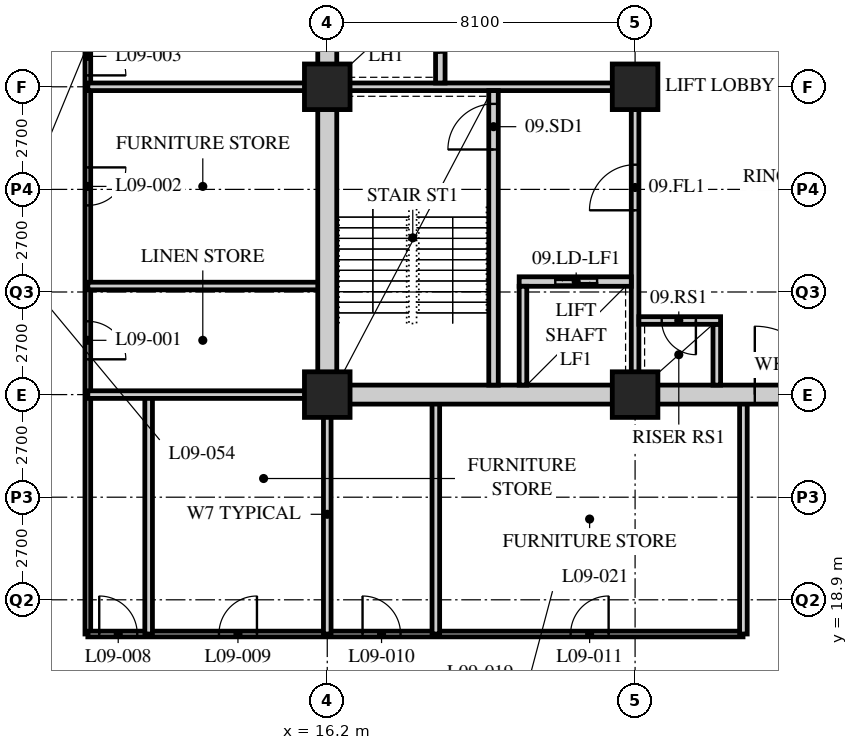
"""IFC4 building model, lengths in metres.
Left out: names, types, materials, properties, quantities, classifications, styles, units other than length and angle.
Written with IfcOpenShell. Run it as: python <this file> out.ifc"""

import sys

from ifc_helpers import new_model, si_unit, direction, frame, frame_2d, origin, origin_2d, place, context, subcontext, project, spatial, rectangle, hollow_rectangle, extrude, element, fill, save


model = new_model("IFC4")
c1 = context("Model", 3, precision=1e-05, world=origin(), true_north=direction((0.0, 1.0)))
c2 = subcontext(c1, "Body", "Model", "MODEL_VIEW")
j1 = project(units=[si_unit("LENGTHUNIT", "METRE"), si_unit("PLANEANGLEUNIT", "RADIAN")], contexts=[c1])
p1 = place(None, origin())
s1 = spatial("IfcSite", under=j1, at=p1, CompositionType="ELEMENT")
p2 = place(p1, origin())
s2 = spatial("IfcBuilding", under=s1, at=p2, CompositionType="ELEMENT")
p3 = place(p2, frame((0.0, 0.0, 43.2)))
s3 = spatial("IfcBuildingStorey", under=s2, at=p3, CompositionType="ELEMENT", Elevation=43.2)
for number, where, z_axis, x_axis in (
    (1, (16.2, 24.3, 0.0), (0.0, 0.0, 1.0), (1.0, 0.0, 0.0)),
    (2, (16.2, 32.4, 0.0), (0.0, 0.0, 1.0), (1.0, 0.0, 0.0)),
    (3, (24.3, 24.3, 0.0), (0.0, 0.0, 1.0), (1.0, 0.0, 0.0)),
    (4, (24.3, 32.4, 0.0), (0.0, 0.0, 1.0), (1.0, 0.0, 0.0)),
):
    element("IfcColumn", number, at=place(p3, frame(where, z_axis=z_axis, x_axis=x_axis)), inside=s3, PredefinedType="COLUMN", context=c2, shape_type="SweptSolid", body=[
        extrude(hollow_rectangle(XDim=1.2, YDim=1.2, WallThickness=0.12, at=origin_2d()), origin(), (0.0, 0.0, 1.0), 3.4),
    ])
p4 = place(p3, frame((9.9, 40.5, 0.0), z_axis=(0.0, 0.0, 1.0), x_axis=(0.0, -1.0, 0.0)))
e5 = element("IfcWall", 5, at=p4, inside=s3, PredefinedType="PARTITIONING", context=c2, shape_type="SweptSolid", body=[
    extrude(rectangle(XDim=22.5, YDim=0.15, at=frame_2d((11.25, 0.0))), origin(), (0.0, 0.0, 1.0), 3.19),
])
p5 = place(p4, frame((14.271, 0.0, 0.0)))
e6 = element("IfcOpeningElement", 6, at=p5, cuts=e5, PredefinedType="OPENING", context=c2, shape_type="SweptSolid", body=[
    extrude(rectangle(XDim=1.0, YDim=2.1, at=frame_2d((0.5, 1.05))), frame((0.0, 0.085, 0.0), z_axis=(0.0, -1.0, 0.0), x_axis=(1.0, 0.0, 0.0)), (0.0, 0.0, 1.0), 0.17),
])
p6 = place(p4, frame((10.221, 0.0, 0.0)))
e7 = element("IfcOpeningElement", 7, at=p6, cuts=e5, PredefinedType="OPENING", context=c2, shape_type="SweptSolid", body=[
    extrude(rectangle(XDim=1.0, YDim=2.1, at=frame_2d((0.5, 1.05))), frame((0.0, 0.085, 0.0), z_axis=(0.0, -1.0, 0.0), x_axis=(1.0, 0.0, 0.0)), (0.0, 0.0, 1.0), 0.17),
])
p7 = place(p4, frame((6.8, 0.0, 0.0)))
e8 = element("IfcOpeningElement", 8, at=p7, cuts=e5, PredefinedType="OPENING", context=c2, shape_type="SweptSolid", body=[
    extrude(rectangle(XDim=1.0, YDim=2.1, at=frame_2d((0.5, 1.05))), frame((0.0, 0.085, 0.0), z_axis=(0.0, -1.0, 0.0), x_axis=(1.0, 0.0, 0.0)), (0.0, 0.0, 1.0), 0.17),
])
p8 = place(p4, frame((2.75, 0.0, 0.0)))
e9 = element("IfcOpeningElement", 9, at=p8, cuts=e5, PredefinedType="OPENING", context=c2, shape_type="SweptSolid", body=[
    extrude(rectangle(XDim=1.0, YDim=2.1, at=frame_2d((0.5, 1.05))), frame((0.0, 0.085, 0.0), z_axis=(0.0, -1.0, 0.0), x_axis=(1.0, 0.0, 0.0)), (0.0, 0.0, 1.0), 0.17),
])
p9 = place(p3, frame((9.9, 18.0, 0.0), z_axis=(0.0, 0.0, 1.0), x_axis=(1.0, 0.0, 0.0)))
e10 = element("IfcWall", 10, at=p9, inside=s3, PredefinedType="PARTITIONING", context=c2, shape_type="SweptSolid", body=[
    extrude(rectangle(XDim=17.24, YDim=0.15, at=frame_2d((8.62, 0.0))), origin(), (0.0, 0.0, 1.0), 3.19),
])
p10 = place(p9, frame((0.3, 0.0, 0.0)))
e11 = element("IfcOpeningElement", 11, at=p10, cuts=e10, PredefinedType="OPENING", context=c2, shape_type="SweptSolid", body=[
    extrude(rectangle(XDim=1.0, YDim=2.1, at=frame_2d((0.5, 1.05))), frame((0.0, 0.085, 0.0), z_axis=(0.0, -1.0, 0.0), x_axis=(1.0, 0.0, 0.0)), (0.0, 0.0, 1.0), 0.17),
])
p11 = place(p9, frame((3.45, 0.0, 0.0)))
e12 = element("IfcOpeningElement", 12, at=p11, cuts=e10, PredefinedType="OPENING", context=c2, shape_type="SweptSolid", body=[
    extrude(rectangle(XDim=1.0, YDim=2.1, at=frame_2d((0.5, 1.05))), frame((0.0, 0.085, 0.0), z_axis=(0.0, -1.0, 0.0), x_axis=(1.0, 0.0, 0.0)), (0.0, 0.0, 1.0), 0.17),
])
p12 = place(p9, frame((7.229, 0.0, 0.0)))
e13 = element("IfcOpeningElement", 13, at=p12, cuts=e10, PredefinedType="OPENING", context=c2, shape_type="SweptSolid", body=[
    extrude(rectangle(XDim=1.0, YDim=2.1, at=frame_2d((0.5, 1.05))), frame((0.0, 0.085, 0.0), z_axis=(0.0, -1.0, 0.0), x_axis=(1.0, 0.0, 0.0)), (0.0, 0.0, 1.0), 0.17),
])
p13 = place(p9, frame((12.704, 0.0, 0.0)))
e14 = element("IfcOpeningElement", 14, at=p13, cuts=e10, PredefinedType="OPENING", context=c2, shape_type="SweptSolid", body=[
    extrude(rectangle(XDim=1.0, YDim=2.1, at=frame_2d((0.5, 1.05))), frame((0.0, 0.085, 0.0), z_axis=(0.0, -1.0, 0.0), x_axis=(1.0, 0.0, 0.0)), (0.0, 0.0, 1.0), 0.17),
])
p14 = place(p3, frame((9.9, 32.4, 0.0), z_axis=(0.0, 0.0, 1.0), x_axis=(1.0, 0.0, 0.0)))
e15 = element("IfcWall", 15, at=p14, inside=s3, PredefinedType="SOLIDWALL", context=c2, shape_type="SweptSolid", body=[
    extrude(rectangle(XDim=6.3, YDim=0.2, at=frame_2d((3.15, 0.0))), origin(), (0.0, 0.0, 1.0), 2.578),
])
p15 = place(p3, frame((9.9, 27.157, 0.0), z_axis=(0.0, 0.0, 1.0), x_axis=(1.0, 0.0, 0.0)))
e16 = element("IfcWall", 16, at=p15, inside=s3, PredefinedType="SOLIDWALL", context=c2, shape_type="SweptSolid", body=[
    extrude(rectangle(XDim=6.3, YDim=0.2, at=frame_2d((3.15, 0.0))), origin(), (0.0, 0.0, 1.0), 3.19),
])
p16 = place(p3, frame((16.2, 18.0, 0.0), z_axis=(0.0, 0.0, 1.0), x_axis=(0.0, 1.0, 0.0)))
e17 = element("IfcWall", 17, at=p16, inside=s3, PredefinedType="SOLIDWALL", context=c2, shape_type="SweptSolid", body=[
    extrude(rectangle(XDim=6.3, YDim=0.2, at=frame_2d((3.15, 0.0))), origin(), (0.0, 0.0, 1.0), 2.578),
])
for number, where, z_axis, x_axis in (
    (18, (11.5, 18.0, 0.0), (0.0, 0.0, 1.0), (0.0, 1.0, 0.0)),
    (19, (19.057, 18.0, 0.0), (0.0, 0.0, 1.0), (0.0, 1.0, 0.0)),
    (20, (27.15, 18.0, 0.0), (0.0, 0.0, 1.0), (0.0, 1.0, 0.0)),
):
    element("IfcWall", number, at=place(p3, frame(where, z_axis=z_axis, x_axis=x_axis)), inside=s3, PredefinedType="SOLIDWALL", context=c2, shape_type="SweptSolid", body=[
        extrude(rectangle(XDim=6.3, YDim=0.2, at=frame_2d((3.15, 0.0))), origin(), (0.0, 0.0, 1.0), 3.19),
    ])
p17 = place(p3, frame((9.9, 24.3, 0.0), z_axis=(0.0, 0.0, 1.0), x_axis=(1.0, 0.0, 0.0)))
e21 = element("IfcWall", 21, at=p17, inside=s3, PredefinedType="SOLIDWALL", context=c2, shape_type="SweptSolid", body=[
    extrude(rectangle(XDim=6.3, YDim=0.2, at=frame_2d((3.15, 0.0))), origin(), (0.0, 0.0, 1.0), 2.578),
])
p18 = place(p3, frame((15.95, 24.3, 0.0), z_axis=(0.0, 0.0, 1.0), x_axis=(1.0, 0.0, 0.0)))
e22 = element("IfcWall", 22, at=p18, inside=s3, PredefinedType="SOLIDWALL", context=c2, shape_type="SweptSolid", body=[
    extrude(rectangle(XDim=24.8, YDim=0.5, at=frame_2d((12.4, 0.0))), origin(), (0.0, 0.0, 1.0), 2.54),
])
p19 = place(p18, frame((11.5, 0.0, 0.0)))
e23 = element("IfcOpeningElement", 23, at=p19, cuts=e22, PredefinedType="OPENING", context=c2, shape_type="SweptSolid", body=[
    extrude(rectangle(XDim=1.8, YDim=2.4, at=frame_2d((0.9, 1.2))), frame((0.0, 0.26, 0.0), z_axis=(0.0, -1.0, 0.0), x_axis=(1.0, 0.0, 0.0)), (0.0, 0.0, 1.0), 0.52),
])
p20 = place(p3, frame((16.2, 24.55, 0.0), z_axis=(0.0, 0.0, 1.0), x_axis=(0.0, 1.0, 0.0)))
e24 = element("IfcWall", 24, at=p20, inside=s3, PredefinedType="SOLIDWALL", context=c2, shape_type="SweptSolid", body=[
    extrude(rectangle(XDim=15.7, YDim=0.5, at=frame_2d((7.85, 0.0))), origin(), (0.0, 0.0, 1.0), 2.578),
])
p21 = place(p3, frame((16.45, 32.4, 0.0), z_axis=(0.0, 0.0, 1.0), x_axis=(1.0, 0.0, 0.0)))
e25 = element("IfcWall", 25, at=p21, inside=s3, PredefinedType="SOLIDWALL", context=c2, shape_type="SweptSolid", body=[
    extrude(rectangle(XDim=7.95, YDim=0.2, at=frame_2d((3.975, 0.0))), origin(), (0.0, 0.0, 1.0), 2.578),
])
p22 = place(p3, frame((24.3, 24.55, 0.0), z_axis=(0.0, 0.0, 1.0), x_axis=(0.0, 1.0, 0.0)))
e26 = element("IfcWall", 26, at=p22, inside=s3, PredefinedType="SOLIDWALL", context=c2, shape_type="SweptSolid", body=[
    extrude(rectangle(XDim=7.75, YDim=0.2, at=frame_2d((3.875, 0.0))), origin(), (0.0, 0.0, 1.0), 2.578),
])
p23 = place(p22, frame((4.6, 0.0, 0.0)))
e27 = element("IfcOpeningElement", 27, at=p23, cuts=e26, PredefinedType="OPENING", context=c2, shape_type="SweptSolid", body=[
    extrude(rectangle(XDim=1.2, YDim=2.1, at=frame_2d((0.6, 1.05))), frame((0.0, 0.11, 0.0), z_axis=(0.0, -1.0, 0.0), x_axis=(1.0, 0.0, 0.0)), (0.0, 0.0, 1.0), 0.22),
])
p24 = place(p3, frame((20.575, 24.55, 0.0), z_axis=(0.0, 0.0, 1.0), x_axis=(0.0, 1.0, 0.0)))
e28 = element("IfcWall", 28, at=p24, inside=s3, PredefinedType="SOLIDWALL", context=c2, shape_type="SweptSolid", body=[
    extrude(rectangle(XDim=7.75, YDim=0.25, at=frame_2d((3.875, 0.0))), origin(), (0.0, 0.0, 1.0), 3.19),
])
p25 = place(p24, frame((6.2, 0.0, 0.0)))
e29 = element("IfcOpeningElement", 29, at=p25, cuts=e28, PredefinedType="OPENING", context=c2, shape_type="SweptSolid", body=[
    extrude(rectangle(XDim=1.2, YDim=2.1, at=frame_2d((0.6, 1.05))), frame((0.0, 0.135, 0.0), z_axis=(0.0, -1.0, 0.0), x_axis=(1.0, 0.0, 0.0)), (0.0, 0.0, 1.0), 0.27),
])
p26 = place(p3, frame((21.25, 27.275, 0.0), z_axis=(0.0, 0.0, 1.0), x_axis=(1.0, 0.0, 0.0)))
e30 = element("IfcWall", 30, at=p26, inside=s3, PredefinedType="SOLIDWALL", context=c2, shape_type="SweptSolid", body=[
    extrude(rectangle(XDim=2.95, YDim=0.25, at=frame_2d((1.475, 0.0))), origin(), (0.0, 0.0, 1.0), 3.19),
])
p27 = place(p26, frame((0.95, 0.0, 0.0)))
e31 = element("IfcOpeningElement", 31, at=p27, cuts=e30, PredefinedType="OPENING", context=c2, shape_type="SweptSolid", body=[
    extrude(rectangle(XDim=1.1, YDim=2.4, at=frame_2d((0.55, 1.2))), frame((0.0, 0.135, 0.0), z_axis=(0.0, -1.0, 0.0), x_axis=(1.0, 0.0, 0.0)), (0.0, 0.0, 1.0), 0.27),
])
p28 = place(p3, frame((21.35, 24.55, 0.0), z_axis=(0.0, 0.0, 1.0), x_axis=(0.0, 1.0, 0.0)))
e32 = element("IfcWall", 32, at=p28, inside=s3, PredefinedType="SOLIDWALL", context=c2, shape_type="SweptSolid", body=[
    extrude(rectangle(XDim=2.6, YDim=0.2, at=frame_2d((1.3, 0.0))), origin(), (0.0, 0.0, 1.0), 3.19),
])
p29 = place(p3, frame((19.175, 32.5, 0.0), z_axis=(0.0, 0.0, 1.0), x_axis=(0.0, 1.0, 0.0)))
e33 = element("IfcWall", 33, at=p29, inside=s3, PredefinedType="SOLIDWALL", context=c2, shape_type="SweptSolid", body=[
    extrude(rectangle(XDim=7.75, YDim=0.25, at=frame_2d((3.875, 0.0))), origin(), (0.0, 0.0, 1.0), 3.19),
])
p30 = place(p29, frame((0.8, 0.0, 0.0)))
e34 = element("IfcOpeningElement", 34, at=p30, cuts=e33, PredefinedType="OPENING", context=c2, shape_type="SweptSolid", body=[
    extrude(rectangle(XDim=1.1, YDim=2.4, at=frame_2d((0.55, 1.2))), frame((0.0, 0.135, 0.0), z_axis=(0.0, -1.0, 0.0), x_axis=(1.0, 0.0, 0.0)), (0.0, 0.0, 1.0), 0.27),
])
p31 = place(p29, frame((3.4, 0.0, 0.0)))
e35 = element("IfcOpeningElement", 35, at=p31, cuts=e33, PredefinedType="OPENING", context=c2, shape_type="SweptSolid", body=[
    extrude(rectangle(XDim=1.1, YDim=2.4, at=frame_2d((0.55, 1.2))), frame((0.0, 0.135, 0.0), z_axis=(0.0, -1.0, 0.0), x_axis=(1.0, 0.0, 0.0)), (0.0, 0.0, 1.0), 0.27),
])
p32 = place(p29, frame((6.0, 0.0, 0.0)))
e36 = element("IfcOpeningElement", 36, at=p32, cuts=e33, PredefinedType="OPENING", context=c2, shape_type="SweptSolid", body=[
    extrude(rectangle(XDim=1.1, YDim=2.4, at=frame_2d((0.55, 1.2))), frame((0.0, 0.135, 0.0), z_axis=(0.0, -1.0, 0.0), x_axis=(1.0, 0.0, 0.0)), (0.0, 0.0, 1.0), 0.27),
])
p33 = place(p3, frame((26.45, 24.55, 0.0), z_axis=(0.0, 0.0, 1.0), x_axis=(0.0, 1.0, 0.0)))
e37 = element("IfcWall", 37, at=p33, inside=s3, PredefinedType="SOLIDWALL", context=c2, shape_type="SweptSolid", body=[
    extrude(rectangle(XDim=1.6, YDim=0.2, at=frame_2d((0.8, 0.0))), origin(), (0.0, 0.0, 1.0), 3.19),
])
p34 = place(p3, frame((24.4, 26.25, 0.0), z_axis=(0.0, 0.0, 1.0), x_axis=(1.0, 0.0, 0.0)))
e38 = element("IfcWall", 38, at=p34, inside=s3, PredefinedType="SOLIDWALL", context=c2, shape_type="SweptSolid", body=[
    extrude(rectangle(XDim=2.15, YDim=0.2, at=frame_2d((1.075, 0.0))), origin(), (0.0, 0.0, 1.0), 3.19),
])
p35 = place(p34, frame((0.6, 0.0, 0.0)))
e39 = element("IfcOpeningElement", 39, at=p35, cuts=e38, PredefinedType="OPENING", context=c2, shape_type="SweptSolid", body=[
    extrude(rectangle(XDim=0.9, YDim=2.1, at=frame_2d((0.45, 1.05))), frame((0.0, 0.11, 0.0), z_axis=(0.0, -1.0, 0.0), x_axis=(1.0, 0.0, 0.0)), (0.0, 0.0, 1.0), 0.22),
])
p36 = place(p5, origin())
e40 = element("IfcDoor", 40, at=p36, inside=s3, OperationType="SINGLE_SWING_RIGHT", PredefinedType="DOOR", context=c2, shape_type="SweptSolid", body=[
    extrude(rectangle(XDim=1.0, YDim=2.1, at=frame_2d((0.5, 1.05))), frame((0.0, 0.025, 0.0), z_axis=(0.0, -1.0, 0.0), x_axis=(1.0, 0.0, 0.0)), (0.0, 0.0, 1.0), 0.05),
])
fill(e6, e40)
p37 = place(p6, origin())
e41 = element("IfcDoor", 41, at=p37, inside=s3, OperationType="SINGLE_SWING_LEFT", PredefinedType="DOOR", context=c2, shape_type="SweptSolid", body=[
    extrude(rectangle(XDim=1.0, YDim=2.1, at=frame_2d((0.5, 1.05))), frame((0.0, 0.025, 0.0), z_axis=(0.0, -1.0, 0.0), x_axis=(1.0, 0.0, 0.0)), (0.0, 0.0, 1.0), 0.05),
])
fill(e7, e41)
p38 = place(p7, origin())
e42 = element("IfcDoor", 42, at=p38, inside=s3, OperationType="SINGLE_SWING_RIGHT", PredefinedType="DOOR", context=c2, shape_type="SweptSolid", body=[
    extrude(rectangle(XDim=1.0, YDim=2.1, at=frame_2d((0.5, 1.05))), frame((0.0, 0.025, 0.0), z_axis=(0.0, -1.0, 0.0), x_axis=(1.0, 0.0, 0.0)), (0.0, 0.0, 1.0), 0.05),
])
fill(e8, e42)
p39 = place(p10, origin())
e43 = element("IfcDoor", 43, at=p39, inside=s3, OperationType="SINGLE_SWING_LEFT", PredefinedType="DOOR", context=c2, shape_type="SweptSolid", body=[
    extrude(rectangle(XDim=1.0, YDim=2.1, at=frame_2d((0.5, 1.05))), frame((0.0, 0.025, 0.0), z_axis=(0.0, -1.0, 0.0), x_axis=(1.0, 0.0, 0.0)), (0.0, 0.0, 1.0), 0.05),
])
fill(e11, e43)
p40 = place(p11, origin())
e44 = element("IfcDoor", 44, at=p40, inside=s3, OperationType="SINGLE_SWING_RIGHT", PredefinedType="DOOR", context=c2, shape_type="SweptSolid", body=[
    extrude(rectangle(XDim=1.0, YDim=2.1, at=frame_2d((0.5, 1.05))), frame((0.0, 0.025, 0.0), z_axis=(0.0, -1.0, 0.0), x_axis=(1.0, 0.0, 0.0)), (0.0, 0.0, 1.0), 0.05),
])
fill(e12, e44)
p41 = place(p12, origin())
e45 = element("IfcDoor", 45, at=p41, inside=s3, OperationType="SINGLE_SWING_LEFT", PredefinedType="DOOR", context=c2, shape_type="SweptSolid", body=[
    extrude(rectangle(XDim=1.0, YDim=2.1, at=frame_2d((0.5, 1.05))), frame((0.0, 0.025, 0.0), z_axis=(0.0, -1.0, 0.0), x_axis=(1.0, 0.0, 0.0)), (0.0, 0.0, 1.0), 0.05),
])
fill(e13, e45)
p42 = place(p13, origin())
e46 = element("IfcDoor", 46, at=p42, inside=s3, OperationType="SINGLE_SWING_RIGHT", PredefinedType="DOOR", context=c2, shape_type="SweptSolid", body=[
    extrude(rectangle(XDim=1.0, YDim=2.1, at=frame_2d((0.5, 1.05))), frame((0.0, 0.025, 0.0), z_axis=(0.0, -1.0, 0.0), x_axis=(1.0, 0.0, 0.0)), (0.0, 0.0, 1.0), 0.05),
])
fill(e14, e46)
p43 = place(p25, origin())
e47 = element("IfcDoor", 47, at=p43, inside=s3, OperationType="SINGLE_SWING_LEFT", PredefinedType="DOOR", context=c2, shape_type="SweptSolid", body=[
    extrude(rectangle(XDim=1.2, YDim=2.1, at=frame_2d((0.6, 1.05))), frame((0.0, 0.025, 0.0), z_axis=(0.0, -1.0, 0.0), x_axis=(1.0, 0.0, 0.0)), (0.0, 0.0, 1.0), 0.05),
])
fill(e29, e47)
p44 = place(p23, origin())
e48 = element("IfcDoor", 48, at=p44, inside=s3, OperationType="SINGLE_SWING_LEFT", PredefinedType="DOOR", context=c2, shape_type="SweptSolid", body=[
    extrude(rectangle(XDim=1.2, YDim=2.1, at=frame_2d((0.6, 1.05))), frame((0.0, 0.025, 0.0), z_axis=(0.0, -1.0, 0.0), x_axis=(1.0, 0.0, 0.0)), (0.0, 0.0, 1.0), 0.05),
])
fill(e27, e48)
p45 = place(p35, origin())
e49 = element("IfcDoor", 49, at=p45, inside=s3, OperationType="SINGLE_SWING_LEFT", PredefinedType="DOOR", context=c2, shape_type="SweptSolid", body=[
    extrude(rectangle(XDim=0.9, YDim=2.1, at=frame_2d((0.45, 1.05))), frame((0.0, 0.025, 0.0), z_axis=(0.0, -1.0, 0.0), x_axis=(1.0, 0.0, 0.0)), (0.0, 0.0, 1.0), 0.05),
])
fill(e39, e49)
p46 = place(p30, origin())
e50 = element("IfcDoor", 50, at=p46, inside=s3, OperationType="DOUBLE_DOOR_SLIDING", PredefinedType="DOOR", context=c2, shape_type="SweptSolid", body=[
    extrude(rectangle(XDim=1.1, YDim=2.4, at=frame_2d((0.55, 1.2))), frame((0.0, 0.025, 0.0), z_axis=(0.0, -1.0, 0.0), x_axis=(1.0, 0.0, 0.0)), (0.0, 0.0, 1.0), 0.05),
])
fill(e34, e50)
p47 = place(p27, origin())
e51 = element("IfcDoor", 51, at=p47, inside=s3, OperationType="DOUBLE_DOOR_SLIDING", PredefinedType="DOOR", context=c2, shape_type="SweptSolid", body=[
    extrude(rectangle(XDim=1.1, YDim=2.4, at=frame_2d((0.55, 1.2))), frame((0.0, 0.025, 0.0), z_axis=(0.0, -1.0, 0.0), x_axis=(1.0, 0.0, 0.0)), (0.0, 0.0, 1.0), 0.05),
])
fill(e31, e51)
p48 = place(p19, origin())
e52 = element("IfcDoor", 52, at=p48, inside=s3, OperationType="DOUBLE_DOOR_SINGLE_SWING", PredefinedType="DOOR", context=c2, shape_type="SweptSolid", body=[
    extrude(rectangle(XDim=1.8, YDim=2.4, at=frame_2d((0.9, 1.2))), frame((0.0, 0.025, 0.0), z_axis=(0.0, -1.0, 0.0), x_axis=(1.0, 0.0, 0.0)), (0.0, 0.0, 1.0), 0.05),
])
fill(e23, e52)
save(model, sys.argv[1])
